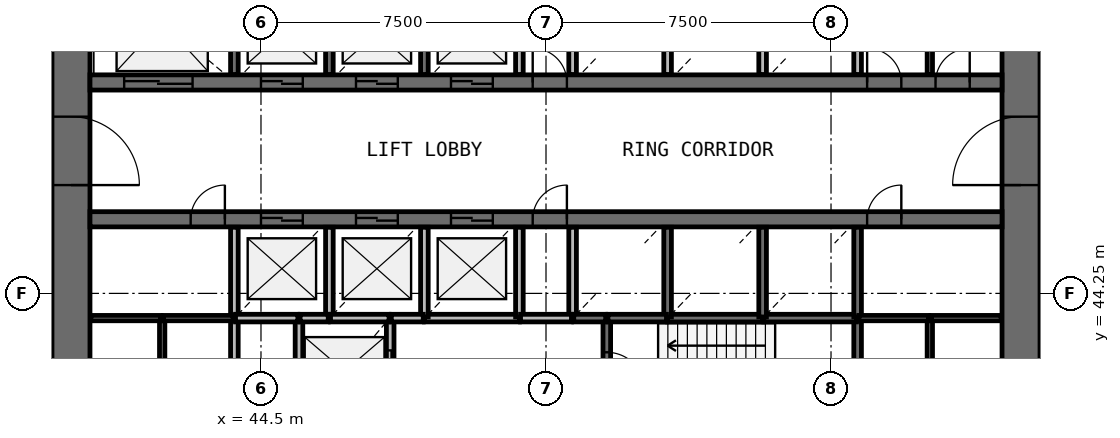
"""IFC4 building model, lengths in metres.
Left out: names, types, materials, properties, quantities, classifications, styles, units other than length and angle.
Written with IfcOpenShell. Run it as: python <this file> out.ifc"""

import sys

from ifc_helpers import new_model, si_unit, direction, frame, frame_2d, origin, place, context, subcontext, project, spatial, rectangle, extrude, source, transform, mapped, element, fill, save


model = new_model("IFC4")
c1 = context("Model", 3, precision=1e-05, world=origin(), true_north=direction((0.0, 1.0)))
c2 = subcontext(c1, "Body", "Model", "MODEL_VIEW")
j1 = project(units=[si_unit("LENGTHUNIT", "METRE"), si_unit("PLANEANGLEUNIT", "RADIAN")], contexts=[c1])
p1 = place(None, origin())
s1 = spatial("IfcSite", under=j1, at=p1, CompositionType="ELEMENT")
p2 = place(p1, origin())
s2 = spatial("IfcBuilding", under=s1, at=p2, CompositionType="ELEMENT")
p3 = place(p2, frame((0.0, 0.0, 62.2)))
s3 = spatial("IfcBuildingStorey", under=s2, at=p3, CompositionType="ELEMENT", Elevation=62.2)
p4 = place(p3, frame((64.5, 38.0, 0.0), z_axis=(0.0, 0.0, 1.0), x_axis=(0.0, 1.0, 0.0)))
e1 = element("IfcWall", 1, at=p4, inside=s3, PredefinedType="SHEAR", context=c2, shape_type="SweptSolid", body=[
    extrude(rectangle(XDim=20.0, YDim=1.0, at=frame_2d((10.0, 0.0))), origin(), (0.0, 0.0, 1.0), 4.4),
])
p5 = place(p4, frame((9.1, 0.0, 0.0)))
e2 = element("IfcOpeningElement", 2, at=p5, cuts=e1, PredefinedType="OPENING", context=c2, shape_type="SweptSolid", body=[
    extrude(rectangle(XDim=1.8, YDim=2.1, at=frame_2d((0.9, 1.05))), frame((0.0, 0.51, 0.0), z_axis=(0.0, -1.0, 0.0), x_axis=(1.0, 0.0, 0.0)), (0.0, 0.0, 1.0), 1.02),
])
p6 = place(p3, frame((39.5, 58.0, 0.0), z_axis=(0.0, 0.0, 1.0), x_axis=(0.0, -1.0, 0.0)))
e3 = element("IfcWall", 3, at=p6, inside=s3, PredefinedType="SHEAR", context=c2, shape_type="SweptSolid", body=[
    extrude(rectangle(XDim=20.0, YDim=1.0, at=frame_2d((10.0, 0.0))), origin(), (0.0, 0.0, 1.0), 4.4),
])
p7 = place(p6, frame((9.1, 0.0, 0.0)))
e4 = element("IfcOpeningElement", 4, at=p7, cuts=e3, PredefinedType="OPENING", context=c2, shape_type="SweptSolid", body=[
    extrude(rectangle(XDim=1.8, YDim=2.1, at=frame_2d((0.9, 1.05))), frame((0.0, 0.51, 0.0), z_axis=(0.0, -1.0, 0.0), x_axis=(1.0, 0.0, 0.0)), (0.0, 0.0, 1.0), 1.02),
])
p8 = place(p3, frame((40.0, 49.8, 0.0), z_axis=(0.0, 0.0, 1.0), x_axis=(1.0, 0.0, 0.0)))
e5 = element("IfcWall", 5, at=p8, inside=s3, PredefinedType="SHEAR", context=c2, shape_type="SweptSolid", body=[
    extrude(rectangle(XDim=24.0, YDim=0.4, at=frame_2d((12.0, 0.0))), origin(), (0.0, 0.0, 1.0), 4.4),
])
p9 = place(p8, frame((4.5, 0.0, 0.0)))
e6 = element("IfcOpeningElement", 6, at=p9, cuts=e5, PredefinedType="OPENING", context=c2, shape_type="SweptSolid", body=[
    extrude(rectangle(XDim=1.1, YDim=2.1, at=frame_2d((0.55, 1.05))), frame((0.0, 0.21, 0.0), z_axis=(0.0, -1.0, 0.0), x_axis=(1.0, 0.0, 0.0)), (0.0, 0.0, 1.0), 0.42),
])
p10 = place(p8, frame((7.0, 0.0, 0.0)))
e7 = element("IfcOpeningElement", 7, at=p10, cuts=e5, PredefinedType="OPENING", context=c2, shape_type="SweptSolid", body=[
    extrude(rectangle(XDim=1.1, YDim=2.1, at=frame_2d((0.55, 1.05))), frame((0.0, 0.21, 0.0), z_axis=(0.0, -1.0, 0.0), x_axis=(1.0, 0.0, 0.0)), (0.0, 0.0, 1.0), 0.42),
])
p11 = place(p8, frame((9.5, 0.0, 0.0)))
e8 = element("IfcOpeningElement", 8, at=p11, cuts=e5, PredefinedType="OPENING", context=c2, shape_type="SweptSolid", body=[
    extrude(rectangle(XDim=1.1, YDim=2.1, at=frame_2d((0.55, 1.05))), frame((0.0, 0.21, 0.0), z_axis=(0.0, -1.0, 0.0), x_axis=(1.0, 0.0, 0.0)), (0.0, 0.0, 1.0), 0.42),
])
p12 = place(p8, frame((0.9, 0.0, 0.0)))
e9 = element("IfcOpeningElement", 9, at=p12, cuts=e5, PredefinedType="OPENING", context=c2, shape_type="SweptSolid", body=[
    extrude(rectangle(XDim=1.8, YDim=2.4, at=frame_2d((0.9, 1.2))), frame((0.0, 0.21, 0.0), z_axis=(0.0, -1.0, 0.0), x_axis=(1.0, 0.0, 0.0)), (0.0, 0.0, 1.0), 0.42),
])
p13 = place(p8, frame((20.45, 0.0, 0.0)))
e10 = element("IfcOpeningElement", 10, at=p13, cuts=e5, PredefinedType="OPENING", context=c2, shape_type="SweptSolid", body=[
    extrude(rectangle(XDim=0.9, YDim=2.1, at=frame_2d((0.45, 1.05))), frame((0.0, 0.21, 0.0), z_axis=(0.0, -1.0, 0.0), x_axis=(1.0, 0.0, 0.0)), (0.0, 0.0, 1.0), 0.42),
])
p14 = place(p8, frame((22.25, 0.0, 0.0)))
e11 = element("IfcOpeningElement", 11, at=p14, cuts=e5, PredefinedType="OPENING", context=c2, shape_type="SweptSolid", body=[
    extrude(rectangle(XDim=0.9, YDim=2.1, at=frame_2d((0.45, 1.05))), frame((0.0, 0.21, 0.0), z_axis=(0.0, -1.0, 0.0), x_axis=(1.0, 0.0, 0.0)), (0.0, 0.0, 1.0), 0.42),
])
p15 = place(p8, frame((11.65, 0.0, 0.0)))
e12 = element("IfcOpeningElement", 12, at=p15, cuts=e5, PredefinedType="OPENING", context=c2, shape_type="SweptSolid", body=[
    extrude(rectangle(XDim=0.9, YDim=2.1, at=frame_2d((0.45, 1.05))), frame((0.0, 0.21, 0.0), z_axis=(0.0, -1.0, 0.0), x_axis=(1.0, 0.0, 0.0)), (0.0, 0.0, 1.0), 0.42),
])
p16 = place(p3, frame((40.0, 46.2, 0.0), z_axis=(0.0, 0.0, 1.0), x_axis=(1.0, 0.0, 0.0)))
e13 = element("IfcWall", 13, at=p16, inside=s3, PredefinedType="SHEAR", context=c2, shape_type="SweptSolid", body=[
    extrude(rectangle(XDim=24.0, YDim=0.4, at=frame_2d((12.0, 0.0))), origin(), (0.0, 0.0, 1.0), 4.4),
])
p17 = place(p16, frame((4.5, 0.0, 0.0)))
e14 = element("IfcOpeningElement", 14, at=p17, cuts=e13, PredefinedType="OPENING", context=c2, shape_type="SweptSolid", body=[
    extrude(rectangle(XDim=1.1, YDim=2.1, at=frame_2d((0.55, 1.05))), frame((0.0, 0.21, 0.0), z_axis=(0.0, -1.0, 0.0), x_axis=(1.0, 0.0, 0.0)), (0.0, 0.0, 1.0), 0.42),
])
p18 = place(p16, frame((7.0, 0.0, 0.0)))
e15 = element("IfcOpeningElement", 15, at=p18, cuts=e13, PredefinedType="OPENING", context=c2, shape_type="SweptSolid", body=[
    extrude(rectangle(XDim=1.1, YDim=2.1, at=frame_2d((0.55, 1.05))), frame((0.0, 0.21, 0.0), z_axis=(0.0, -1.0, 0.0), x_axis=(1.0, 0.0, 0.0)), (0.0, 0.0, 1.0), 0.42),
])
p19 = place(p16, frame((9.5, 0.0, 0.0)))
e16 = element("IfcOpeningElement", 16, at=p19, cuts=e13, PredefinedType="OPENING", context=c2, shape_type="SweptSolid", body=[
    extrude(rectangle(XDim=1.1, YDim=2.1, at=frame_2d((0.55, 1.05))), frame((0.0, 0.21, 0.0), z_axis=(0.0, -1.0, 0.0), x_axis=(1.0, 0.0, 0.0)), (0.0, 0.0, 1.0), 0.42),
])
p20 = place(p16, frame((20.45, 0.0, 0.0)))
e17 = element("IfcOpeningElement", 17, at=p20, cuts=e13, PredefinedType="OPENING", context=c2, shape_type="SweptSolid", body=[
    extrude(rectangle(XDim=0.9, YDim=2.1, at=frame_2d((0.45, 1.05))), frame((0.0, 0.21, 0.0), z_axis=(0.0, -1.0, 0.0), x_axis=(1.0, 0.0, 0.0)), (0.0, 0.0, 1.0), 0.42),
])
p21 = place(p16, frame((2.65, 0.0, 0.0)))
e18 = element("IfcOpeningElement", 18, at=p21, cuts=e13, PredefinedType="OPENING", context=c2, shape_type="SweptSolid", body=[
    extrude(rectangle(XDim=0.9, YDim=2.1, at=frame_2d((0.45, 1.05))), frame((0.0, 0.21, 0.0), z_axis=(0.0, -1.0, 0.0), x_axis=(1.0, 0.0, 0.0)), (0.0, 0.0, 1.0), 0.42),
])
p22 = place(p16, frame((11.65, 0.0, 0.0)))
e19 = element("IfcOpeningElement", 19, at=p22, cuts=e13, PredefinedType="OPENING", context=c2, shape_type="SweptSolid", body=[
    extrude(rectangle(XDim=0.9, YDim=2.1, at=frame_2d((0.45, 1.05))), frame((0.0, 0.21, 0.0), z_axis=(0.0, -1.0, 0.0), x_axis=(1.0, 0.0, 0.0)), (0.0, 0.0, 1.0), 0.42),
])
for number, where, z_axis, x_axis in (
    (20, (43.8, 43.6, 0.0), (0.0, 0.0, 1.0), (0.0, -1.0, 0.0)),
    (21, (45.5, 43.6, 0.0), (0.0, 0.0, 1.0), (0.0, -1.0, 0.0)),
):
    element("IfcWall", number, at=place(p3, frame(where, z_axis=z_axis, x_axis=x_axis)), inside=s3, PredefinedType="SOLIDWALL", context=c2, shape_type="SweptSolid", body=[
        extrude(rectangle(XDim=2.8, YDim=0.2, at=frame_2d((1.4, 0.0))), origin(), (0.0, 0.0, 1.0), 3.95),
    ])
p23 = place(p3, frame((47.9, 40.83, 0.0), z_axis=(0.0, 0.0, 1.0), x_axis=(0.0, 1.0, 0.0)))
e22 = element("IfcWall", 22, at=p23, inside=s3, PredefinedType="SOLIDWALL", context=c2, shape_type="SweptSolid", body=[
    extrude(rectangle(XDim=2.77, YDim=0.2, at=frame_2d((1.385, 0.0))), origin(), (0.0, 0.0, 1.0), 3.95),
])
p24 = place(p23, frame((0.82, 0.0, 0.0)))
e23 = element("IfcOpeningElement", 23, at=p24, cuts=e22, PredefinedType="OPENING", context=c2, shape_type="SweptSolid", body=[
    extrude(rectangle(XDim=1.1, YDim=2.1, at=frame_2d((0.55, 1.05))), frame((0.0, 0.11, 0.0), z_axis=(0.0, -1.0, 0.0), x_axis=(1.0, 0.0, 0.0)), (0.0, 0.0, 1.0), 0.22),
])
p25 = place(p3, frame((60.2, 40.83, 0.0), z_axis=(0.0, 0.0, 1.0), x_axis=(0.0, 1.0, 0.0)))
e24 = element("IfcWall", 24, at=p25, inside=s3, PredefinedType="SOLIDWALL", context=c2, shape_type="SweptSolid", body=[
    extrude(rectangle(XDim=2.77, YDim=0.2, at=frame_2d((1.385, 0.0))), origin(), (0.0, 0.0, 1.0), 3.95),
])
p26 = place(p3, frame((53.6, 43.6, 0.0), z_axis=(0.0, 0.0, 1.0), x_axis=(0.0, -1.0, 0.0)))
e25 = element("IfcWall", 25, at=p26, inside=s3, PredefinedType="SOLIDWALL", context=c2, shape_type="SweptSolid", body=[
    extrude(rectangle(XDim=2.77, YDim=0.2, at=frame_2d((1.385, 0.0))), origin(), (0.0, 0.0, 1.0), 3.95),
])
p27 = place(p26, frame((0.9, 0.0, 0.0)))
e26 = element("IfcOpeningElement", 26, at=p27, cuts=e25, PredefinedType="OPENING", context=c2, shape_type="SweptSolid", body=[
    extrude(rectangle(XDim=1.0, YDim=2.1, at=frame_2d((0.5, 1.05))), frame((0.0, 0.11, 0.0), z_axis=(0.0, -1.0, 0.0), x_axis=(1.0, 0.0, 0.0)), (0.0, 0.0, 1.0), 0.22),
])
for number, where, z_axis, x_axis in (
    (27, (48.8, 43.6, 0.0), (0.0, 0.0, 1.0), (1.0, 0.0, 0.0)),
    (28, (55.2, 43.6, 0.0), (0.0, 0.0, 1.0), (1.0, 0.0, 0.0)),
):
    element("IfcWall", number, at=place(p3, frame(where, z_axis=z_axis, x_axis=x_axis)), inside=s3, PredefinedType="SOLIDWALL", context=c2, shape_type="SweptSolid", body=[
        extrude(rectangle(XDim=2.5, YDim=0.2, at=frame_2d((1.25, 0.0))), origin(), (0.0, 0.0, 1.0), 3.95),
    ])
p28 = place(p3, frame((57.73, 43.6, 0.0), z_axis=(0.0, 0.0, 1.0), x_axis=(1.0, 0.0, 0.0)))
e29 = element("IfcWall", 29, at=p28, inside=s3, PredefinedType="SOLIDWALL", context=c2, shape_type="SweptSolid", body=[
    extrude(rectangle(XDim=2.44, YDim=0.2, at=frame_2d((1.22, 0.0))), origin(), (0.0, 0.0, 1.0), 3.95),
])
for number, where, z_axis, x_axis in (
    (30, (43.8, 45.99, 0.0), (0.0, 0.0, 1.0), (0.0, -1.0, 0.0)),
    (31, (43.8, 52.37, 0.0), (0.0, 0.0, 1.0), (0.0, -1.0, 0.0)),
):
    element("IfcWall", number, at=place(p3, frame(where, z_axis=z_axis, x_axis=x_axis)), inside=s3, PredefinedType="SOLIDWALL", context=c2, shape_type="SweptSolid", body=[
        extrude(rectangle(XDim=2.36, YDim=0.2, at=frame_2d((1.18, 0.0))), origin(), (0.0, 0.0, 1.0), 3.95),
    ])
p29 = place(p3, frame((46.3, 43.6, 0.0), z_axis=(0.0, 0.0, 1.0), x_axis=(0.0, 1.0, 0.0)))
e32 = element("IfcWall", 32, at=p29, inside=s3, PredefinedType="SOLIDWALL", context=c2, shape_type="SweptSolid", body=[
    extrude(rectangle(XDim=2.39, YDim=0.2, at=frame_2d((1.195, 0.0))), origin(), (0.0, 0.0, 1.0), 3.95),
])
for number, where, z_axis, x_axis in (
    (33, (46.3, 50.01, 0.0), (0.0, 0.0, 1.0), (0.0, 1.0, 0.0)),
    (34, (48.8, 43.63, 0.0), (0.0, 0.0, 1.0), (0.0, 1.0, 0.0)),
    (35, (48.8, 50.01, 0.0), (0.0, 0.0, 1.0), (0.0, 1.0, 0.0)),
    (36, (51.3, 43.63, 0.0), (0.0, 0.0, 1.0), (0.0, 1.0, 0.0)),
):
    element("IfcWall", number, at=place(p3, frame(where, z_axis=z_axis, x_axis=x_axis)), inside=s3, PredefinedType="SOLIDWALL", context=c2, shape_type="SweptSolid", body=[
        extrude(rectangle(XDim=2.36, YDim=0.2, at=frame_2d((1.18, 0.0))), origin(), (0.0, 0.0, 1.0), 3.95),
    ])
for number, where, z_axis, x_axis in (
    (37, (51.3, 50.01, 0.0), (0.0, 0.0, 1.0), (0.0, 1.0, 0.0)),
    (38, (52.7, 45.99, 0.0), (0.0, 0.0, 1.0), (0.0, -1.0, 0.0)),
):
    element("IfcWall", number, at=place(p3, frame(where, z_axis=z_axis, x_axis=x_axis)), inside=s3, PredefinedType="SOLIDWALL", context=c2, shape_type="SweptSolid", body=[
        extrude(rectangle(XDim=2.39, YDim=0.2, at=frame_2d((1.195, 0.0))), origin(), (0.0, 0.0, 1.0), 3.95),
    ])
for number, where, z_axis, x_axis in (
    (39, (52.7, 52.37, 0.0), (0.0, 0.0, 1.0), (0.0, -1.0, 0.0)),
    (40, (55.2, 43.63, 0.0), (0.0, 0.0, 1.0), (0.0, 1.0, 0.0)),
    (41, (55.2, 50.01, 0.0), (0.0, 0.0, 1.0), (0.0, 1.0, 0.0)),
    (42, (57.7, 43.63, 0.0), (0.0, 0.0, 1.0), (0.0, 1.0, 0.0)),
):
    element("IfcWall", number, at=place(p3, frame(where, z_axis=z_axis, x_axis=x_axis)), inside=s3, PredefinedType="SOLIDWALL", context=c2, shape_type="SweptSolid", body=[
        extrude(rectangle(XDim=2.36, YDim=0.2, at=frame_2d((1.18, 0.0))), origin(), (0.0, 0.0, 1.0), 3.95),
    ])
p30 = place(p3, frame((57.7, 50.01, 0.0), z_axis=(0.0, 0.0, 1.0), x_axis=(0.0, 1.0, 0.0)))
e43 = element("IfcWall", 43, at=p30, inside=s3, PredefinedType="SOLIDWALL", context=c2, shape_type="SweptSolid", body=[
    extrude(rectangle(XDim=2.39, YDim=0.2, at=frame_2d((1.195, 0.0))), origin(), (0.0, 0.0, 1.0), 3.95),
])
for number, where, z_axis, x_axis in (
    (44, (60.2, 43.63, 0.0), (0.0, 0.0, 1.0), (0.0, 1.0, 0.0)),
    (45, (60.2, 50.01, 0.0), (0.0, 0.0, 1.0), (0.0, 1.0, 0.0)),
):
    element("IfcWall", number, at=place(p3, frame(where, z_axis=z_axis, x_axis=x_axis)), inside=s3, PredefinedType="SOLIDWALL", context=c2, shape_type="SweptSolid", body=[
        extrude(rectangle(XDim=2.36, YDim=0.2, at=frame_2d((1.18, 0.0))), origin(), (0.0, 0.0, 1.0), 3.95),
    ])
p31 = place(p3, frame((43.83, 43.6, 0.0), z_axis=(0.0, 0.0, 1.0), x_axis=(1.0, 0.0, 0.0)))
e46 = element("IfcWall", 46, at=p31, inside=s3, PredefinedType="SOLIDWALL", context=c2, shape_type="SweptSolid", body=[
    extrude(rectangle(XDim=1.64, YDim=0.2, at=frame_2d((0.82, 0.0))), origin(), (0.0, 0.0, 1.0), 3.95),
])
for number, where, z_axis, x_axis in (
    (47, (46.33, 43.6, 0.0), (0.0, 0.0, 1.0), (1.0, 0.0, 0.0)),
    (48, (53.63, 43.6, 0.0), (0.0, 0.0, 1.0), (1.0, 0.0, 0.0)),
):
    element("IfcWall", number, at=place(p3, frame(where, z_axis=z_axis, x_axis=x_axis)), inside=s3, PredefinedType="SOLIDWALL", context=c2, shape_type="SweptSolid", body=[
        extrude(rectangle(XDim=1.54, YDim=0.2, at=frame_2d((0.77, 0.0))), origin(), (0.0, 0.0, 1.0), 3.95),
    ])
p32 = place(p3, frame((52.67, 43.6, 0.0), z_axis=(0.0, 0.0, 1.0), x_axis=(-1.0, 0.0, 0.0)))
e49 = element("IfcWall", 49, at=p32, inside=s3, PredefinedType="SOLIDWALL", context=c2, shape_type="SweptSolid", body=[
    extrude(rectangle(XDim=1.34, YDim=0.2, at=frame_2d((0.67, 0.0))), origin(), (0.0, 0.0, 1.0), 3.95),
])
for number, where, z_axis, x_axis in (
    (50, (47.93, 43.6, 0.0), (0.0, 0.0, 1.0), (1.0, 0.0, 0.0)),
    (51, (52.73, 43.6, 0.0), (0.0, 0.0, 1.0), (1.0, 0.0, 0.0)),
):
    element("IfcWall", number, at=place(p3, frame(where, z_axis=z_axis, x_axis=x_axis)), inside=s3, PredefinedType="SOLIDWALL", context=c2, shape_type="SweptSolid", body=[
        extrude(rectangle(XDim=0.84, YDim=0.2, at=frame_2d((0.42, 0.0))), origin(), (0.0, 0.0, 1.0), 3.95),
    ])
p33 = place(p3, frame((45.53, 43.6, 0.0), z_axis=(0.0, 0.0, 1.0), x_axis=(1.0, 0.0, 0.0)))
e52 = element("IfcWall", 52, at=p33, inside=s3, PredefinedType="SOLIDWALL", context=c2, shape_type="SweptSolid", body=[
    extrude(rectangle(XDim=0.74, YDim=0.2, at=frame_2d((0.37, 0.0))), origin(), (0.0, 0.0, 1.0), 3.95),
])
for number, where, z_axis, x_axis in (
    (53, (41.9, 40.89, 0.0), (0.0, 0.0, 1.0), (0.0, 1.0, 0.0)),
    (54, (62.1, 40.89, 0.0), (0.0, 0.0, 1.0), (0.0, 1.0, 0.0)),
):
    element("IfcWall", number, at=place(p3, frame(where, z_axis=z_axis, x_axis=x_axis)), inside=s3, PredefinedType="PARTITIONING", context=c2, shape_type="SweptSolid", body=[
        extrude(rectangle(XDim=2.71, YDim=0.14, at=frame_2d((1.355, 0.0))), origin(), (0.0, 0.0, 1.0), 3.05),
    ])
p34 = place(p3, frame((62.1, 50.01, 0.0), z_axis=(0.0, 0.0, 1.0), x_axis=(0.0, 1.0, 0.0)))
e55 = element("IfcWall", 55, at=p34, inside=s3, PredefinedType="PARTITIONING", context=c2, shape_type="SweptSolid", body=[
    extrude(rectangle(XDim=2.39, YDim=0.14, at=frame_2d((1.195, 0.0))), origin(), (0.0, 0.0, 1.0), 3.05),
])
for number, where, z_axis, x_axis in (
    (56, (43.77, 43.6, 0.0), (0.0, 0.0, 1.0), (-1.0, 0.0, 0.0)),
    (57, (60.23, 43.6, 0.0), (0.0, 0.0, 1.0), (1.0, 0.0, 0.0)),
):
    element("IfcWall", number, at=place(p3, frame(where, z_axis=z_axis, x_axis=x_axis)), inside=s3, PredefinedType="PARTITIONING", context=c2, shape_type="SweptSolid", body=[
        extrude(rectangle(XDim=1.84, YDim=0.14, at=frame_2d((0.92, 0.0))), origin(), (0.0, 0.0, 1.0), 3.05),
    ])
for number, where, z_axis, x_axis in (
    (58, (41.87, 43.6, 0.0), (0.0, 0.0, 1.0), (-1.0, 0.0, 0.0)),
    (59, (62.13, 43.6, 0.0), (0.0, 0.0, 1.0), (1.0, 0.0, 0.0)),
):
    element("IfcWall", number, at=place(p3, frame(where, z_axis=z_axis, x_axis=x_axis)), inside=s3, PredefinedType="PARTITIONING", context=c2, shape_type="SweptSolid", body=[
        extrude(rectangle(XDim=1.85, YDim=0.14, at=frame_2d((0.925, 0.0))), origin(), (0.0, 0.0, 1.0), 3.05),
    ])
m1 = source(origin(), c2, "Body", "SweptSolid", [
    extrude(rectangle(XDim=1.8, YDim=2.1, at=frame_2d((0.9, 1.05))), frame((0.0, 0.025, 0.0), z_axis=(0.0, -1.0, 0.0), x_axis=(1.0, 0.0, 0.0)), (0.0, 0.0, 1.0), 0.05),
])
p35 = place(p7, origin())
e60 = element("IfcDoor", 60, at=p35, inside=s3, OperationType="SINGLE_SWING_RIGHT", PredefinedType="DOOR", context=c2, shape_type="MappedRepresentation", body=[
    mapped(m1, transform((0.0, 0.0, 0.0), scale=1.0)),
])
fill(e4, e60)
p36 = place(p5, origin())
e61 = element("IfcDoor", 61, at=p36, inside=s3, OperationType="SINGLE_SWING_LEFT", PredefinedType="DOOR", context=c2, shape_type="MappedRepresentation", body=[
    mapped(m1, transform((0.0, 0.0, 0.0), scale=1.0)),
])
fill(e2, e61)
m2 = source(origin(), c2, "Body", "SweptSolid", [
    extrude(rectangle(XDim=1.1, YDim=2.1, at=frame_2d((0.55, 1.05))), frame((0.0, 0.025, 0.0), z_axis=(0.0, -1.0, 0.0), x_axis=(1.0, 0.0, 0.0)), (0.0, 0.0, 1.0), 0.05),
])
p37 = place(p9, origin())
e62 = element("IfcDoor", 62, at=p37, inside=s3, OperationType="DOUBLE_DOOR_SLIDING", PredefinedType="USERDEFINED", context=c2, shape_type="MappedRepresentation", body=[
    mapped(m2, transform((0.0, 0.0, 0.0), scale=1.0)),
])
fill(e6, e62)
p38 = place(p10, origin())
e63 = element("IfcDoor", 63, at=p38, inside=s3, OperationType="DOUBLE_DOOR_SLIDING", PredefinedType="USERDEFINED", context=c2, shape_type="MappedRepresentation", body=[
    mapped(m2, transform((0.0, 0.0, 0.0), scale=1.0)),
])
fill(e7, e63)
p39 = place(p11, origin())
e64 = element("IfcDoor", 64, at=p39, inside=s3, OperationType="DOUBLE_DOOR_SLIDING", PredefinedType="USERDEFINED", context=c2, shape_type="MappedRepresentation", body=[
    mapped(m2, transform((0.0, 0.0, 0.0), scale=1.0)),
])
fill(e8, e64)
p40 = place(p17, origin())
e65 = element("IfcDoor", 65, at=p40, inside=s3, OperationType="DOUBLE_DOOR_SLIDING", PredefinedType="USERDEFINED", context=c2, shape_type="MappedRepresentation", body=[
    mapped(m2, transform((0.0, 0.0, 0.0), scale=1.0)),
])
fill(e14, e65)
p41 = place(p18, origin())
e66 = element("IfcDoor", 66, at=p41, inside=s3, OperationType="DOUBLE_DOOR_SLIDING", PredefinedType="USERDEFINED", context=c2, shape_type="MappedRepresentation", body=[
    mapped(m2, transform((0.0, 0.0, 0.0), scale=1.0)),
])
fill(e15, e66)
p42 = place(p19, origin())
e67 = element("IfcDoor", 67, at=p42, inside=s3, OperationType="DOUBLE_DOOR_SLIDING", PredefinedType="USERDEFINED", context=c2, shape_type="MappedRepresentation", body=[
    mapped(m2, transform((0.0, 0.0, 0.0), scale=1.0)),
])
fill(e16, e67)
p43 = place(p24, origin())
e68 = element("IfcDoor", 68, at=p43, inside=s3, OperationType="DOUBLE_DOOR_SLIDING", PredefinedType="USERDEFINED", context=c2, shape_type="MappedRepresentation", body=[
    mapped(m2, transform((0.0, 0.0, 0.0), scale=1.0)),
])
fill(e23, e68)
m3 = source(origin(), c2, "Body", "SweptSolid", [
    extrude(rectangle(XDim=1.8, YDim=2.4, at=frame_2d((0.9, 1.2))), frame((0.0, 0.025, 0.0), z_axis=(0.0, -1.0, 0.0), x_axis=(1.0, 0.0, 0.0)), (0.0, 0.0, 1.0), 0.05),
])
p44 = place(p12, origin())
e69 = element("IfcDoor", 69, at=p44, inside=s3, OperationType="DOUBLE_DOOR_SLIDING", PredefinedType="USERDEFINED", context=c2, shape_type="MappedRepresentation", body=[
    mapped(m3, transform((0.0, 0.0, 0.0), scale=1.0)),
])
fill(e9, e69)
m4 = source(origin(), c2, "Body", "SweptSolid", [
    extrude(rectangle(XDim=1.0, YDim=2.1, at=frame_2d((0.5, 1.05))), frame((0.0, 0.025, 0.0), z_axis=(0.0, -1.0, 0.0), x_axis=(1.0, 0.0, 0.0)), (0.0, 0.0, 1.0), 0.05),
])
p45 = place(p27, origin())
e70 = element("IfcDoor", 70, at=p45, inside=s3, OperationType="SINGLE_SWING_RIGHT", PredefinedType="DOOR", context=c2, shape_type="MappedRepresentation", body=[
    mapped(m4, transform((0.0, 0.0, 0.0), scale=1.0)),
])
fill(e26, e70)
m5 = source(origin(), c2, "Body", "SweptSolid", [
    extrude(rectangle(XDim=0.9, YDim=2.1, at=frame_2d((0.45, 1.05))), frame((0.0, 0.025, 0.0), z_axis=(0.0, -1.0, 0.0), x_axis=(1.0, 0.0, 0.0)), (0.0, 0.0, 1.0), 0.05),
])
p46 = place(p20, origin())
e71 = element("IfcDoor", 71, at=p46, inside=s3, OperationType="SINGLE_SWING_RIGHT", PredefinedType="DOOR", context=c2, shape_type="MappedRepresentation", body=[
    mapped(m5, transform((0.0, 0.0, 0.0), scale=1.0)),
])
fill(e17, e71)
p47 = place(p13, origin())
e72 = element("IfcDoor", 72, at=p47, inside=s3, OperationType="SINGLE_SWING_LEFT", PredefinedType="DOOR", context=c2, shape_type="MappedRepresentation", body=[
    mapped(m5, transform((0.0, 0.0, 0.0), scale=1.0)),
])
fill(e10, e72)
p48 = place(p14, origin())
e73 = element("IfcDoor", 73, at=p48, inside=s3, OperationType="SINGLE_SWING_RIGHT", PredefinedType="DOOR", context=c2, shape_type="MappedRepresentation", body=[
    mapped(m5, transform((0.0, 0.0, 0.0), scale=1.0)),
])
fill(e11, e73)
p49 = place(p21, origin())
e74 = element("IfcDoor", 74, at=p49, inside=s3, OperationType="SINGLE_SWING_RIGHT", PredefinedType="DOOR", context=c2, shape_type="MappedRepresentation", body=[
    mapped(m5, transform((0.0, 0.0, 0.0), scale=1.0)),
])
fill(e18, e74)
p50 = place(p15, origin())
e75 = element("IfcDoor", 75, at=p50, inside=s3, OperationType="SINGLE_SWING_LEFT", PredefinedType="DOOR", context=c2, shape_type="MappedRepresentation", body=[
    mapped(m5, transform((0.0, 0.0, 0.0), scale=1.0)),
])
fill(e12, e75)
p51 = place(p22, origin())
e76 = element("IfcDoor", 76, at=p51, inside=s3, OperationType="SINGLE_SWING_RIGHT", PredefinedType="DOOR", context=c2, shape_type="MappedRepresentation", body=[
    mapped(m5, transform((0.0, 0.0, 0.0), scale=1.0)),
])
fill(e19, e76)
save(model, sys.argv[1])
